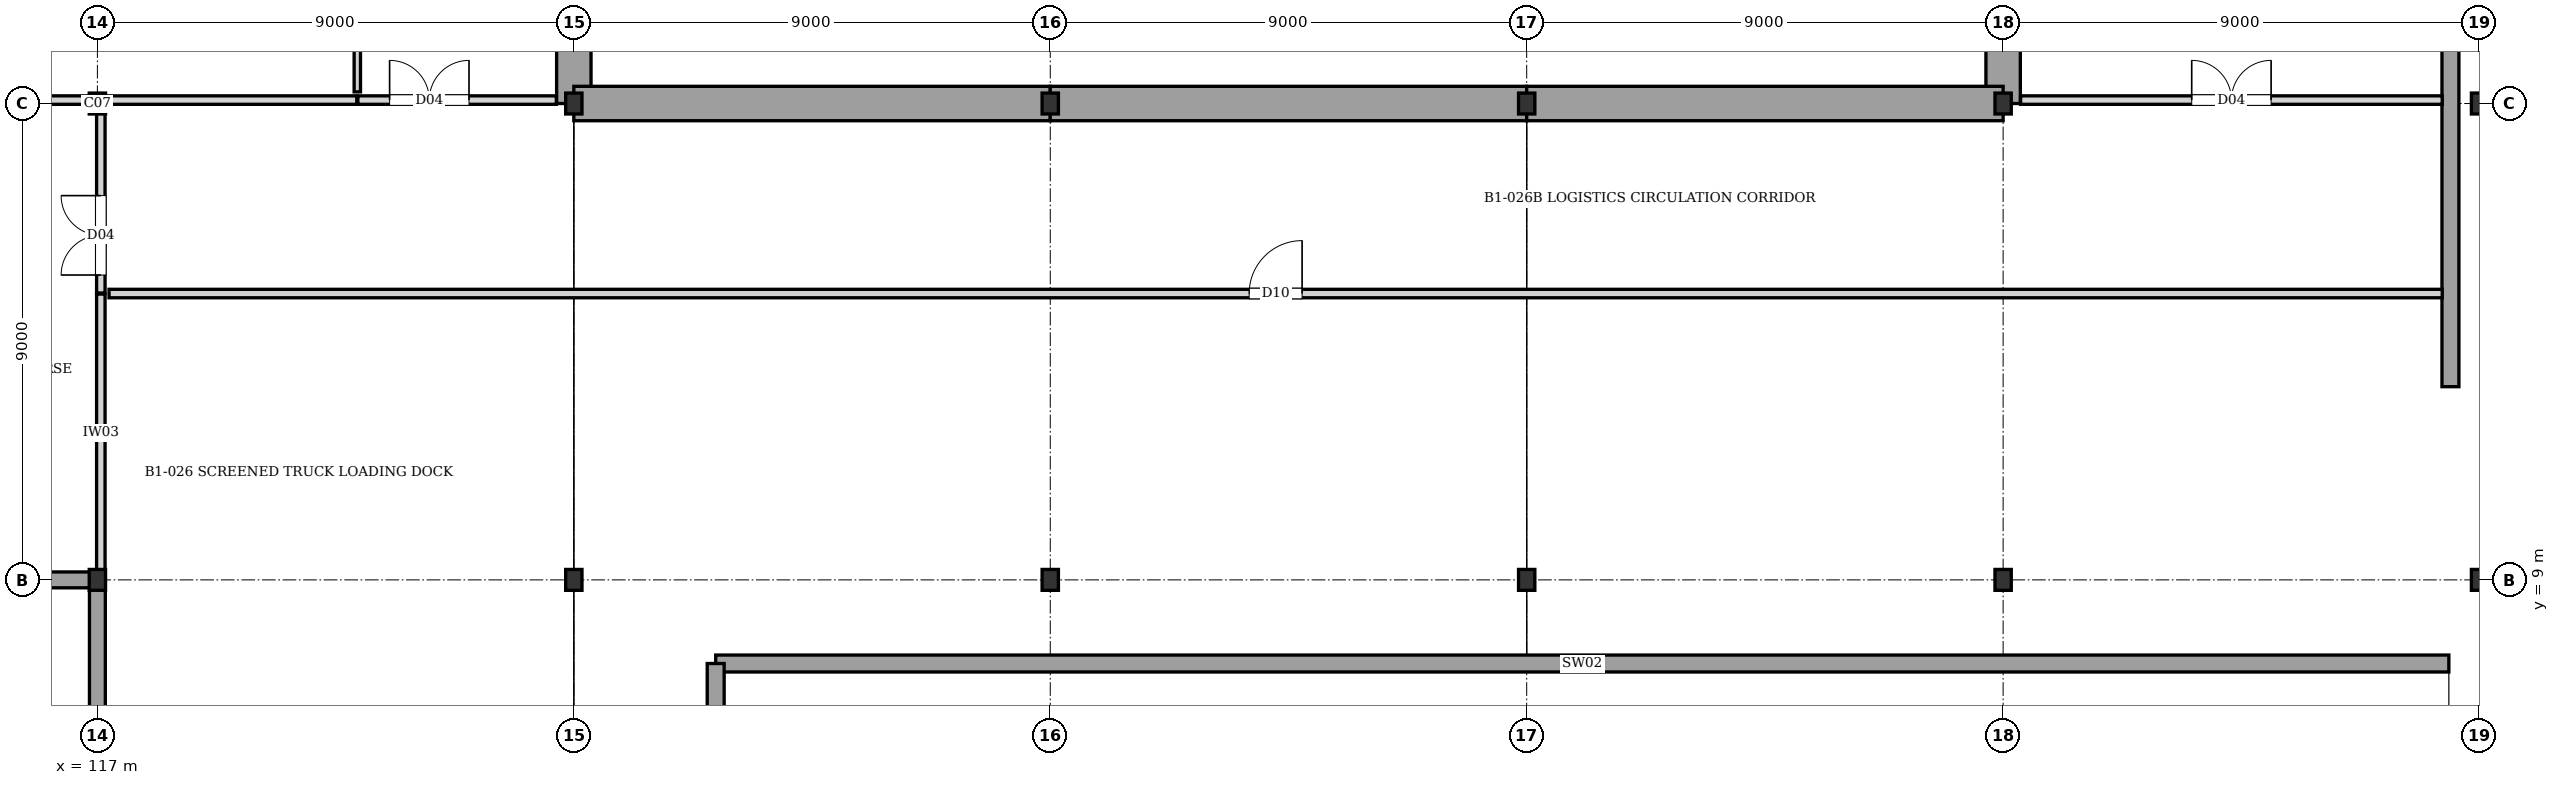
"""IFC4 building model, lengths in metres.
Left out: names, types, materials, properties, quantities, classifications, styles, units other than length and angle.
Written with IfcOpenShell. Run it as: python <this file> out.ifc"""

import sys

from ifc_helpers import new_model, si_unit, direction, frame, frame_2d, origin, origin_2d, place, context, subcontext, project, spatial, rectangle, i_section, extrude, element, fill, save


model = new_model("IFC4")
c1 = context("Model", 3, precision=1e-05, world=origin(), true_north=direction((0.0, 1.0)))
c2 = subcontext(c1, "Body", "Model", "MODEL_VIEW")
j1 = project(units=[si_unit("LENGTHUNIT", "METRE"), si_unit("PLANEANGLEUNIT", "RADIAN")], contexts=[c1])
p1 = place(None, origin())
s1 = spatial("IfcSite", under=j1, at=p1, CompositionType="ELEMENT")
p2 = place(p1, origin())
s2 = spatial("IfcBuilding", under=s1, at=p2, CompositionType="ELEMENT")
p3 = place(p2, frame((0.0, 0.0, -4.48)))
s3 = spatial("IfcBuildingStorey", under=s2, at=p3, CompositionType="ELEMENT", Elevation=-4.48)
for number, where, z_axis, x_axis in (
    (1, (117.0, 9.0, 0.0), (0.0, 0.0, 1.0), (1.0, 0.0, 0.0)),
    (2, (117.0, 18.0, 0.0), (0.0, 0.0, 1.0), (1.0, 0.0, 0.0)),
    (3, (126.0, 9.0, 0.0), (0.0, 0.0, 1.0), (1.0, 0.0, 0.0)),
    (4, (126.0, 18.0, 0.0), (0.0, 0.0, 1.0), (1.0, 0.0, 0.0)),
    (5, (135.0, 9.0, 0.0), (0.0, 0.0, 1.0), (1.0, 0.0, 0.0)),
    (6, (135.0, 18.0, 0.0), (0.0, 0.0, 1.0), (1.0, 0.0, 0.0)),
    (7, (144.0, 9.0, 0.0), (0.0, 0.0, 1.0), (1.0, 0.0, 0.0)),
    (8, (144.0, 18.0, 0.0), (0.0, 0.0, 1.0), (1.0, 0.0, 0.0)),
    (9, (153.0, 9.0, 0.0), (0.0, 0.0, 1.0), (1.0, 0.0, 0.0)),
    (10, (153.0, 18.0, 0.0), (0.0, 0.0, 1.0), (1.0, 0.0, 0.0)),
    (11, (162.0, 9.0, 0.0), (0.0, 0.0, 1.0), (1.0, 0.0, 0.0)),
    (12, (162.0, 18.0, 0.0), (0.0, 0.0, 1.0), (1.0, 0.0, 0.0)),
):
    element("IfcColumn", number, at=place(p3, frame(where, z_axis=z_axis, x_axis=x_axis)), inside=s3, PredefinedType="COLUMN", context=c2, shape_type="SweptSolid", body=[
        extrude(i_section(OverallWidth=0.308, OverallDepth=0.395, WebThickness=0.021, FlangeThickness=0.04, at=origin_2d()), origin(), (0.0, 0.0, 1.0), 4.48),
    ])
for number, where, z_axis, x_axis in (
    (13, (153.0, 18.0, 0.0), (0.0, 0.0, 1.0), (0.0, 1.0, 0.0)),
    (14, (126.0, 27.0, 0.0), (0.0, 0.0, 1.0), (0.0, -1.0, 0.0)),
    (15, (126.0, 18.0, 0.0), (0.0, 0.0, 1.0), (1.0, 0.0, 0.0)),
    (16, (135.0, 18.0, 0.0), (0.0, 0.0, 1.0), (1.0, 0.0, 0.0)),
    (17, (144.0, 18.0, 0.0), (0.0, 0.0, 1.0), (1.0, 0.0, 0.0)),
):
    element("IfcWall", number, at=place(p3, frame(where, z_axis=z_axis, x_axis=x_axis)), inside=s3, PredefinedType="USERDEFINED", context=c2, shape_type="SweptSolid", body=[
        extrude(rectangle(XDim=9.0, YDim=0.65, at=frame_2d((4.5, 0.0))), origin(), (0.0, 0.0, 1.0), 4.22),
    ])
p4 = place(p3, frame((117.0, 0.0, 0.0), z_axis=(0.0, 0.0, 1.0), x_axis=(0.0, 1.0, 0.0)))
e18 = element("IfcWall", 18, at=p4, inside=s3, PredefinedType="SHEAR", context=c2, shape_type="SweptSolid", body=[
    extrude(rectangle(XDim=9.0, YDim=0.3, at=frame_2d((4.5, 0.0))), origin(), (0.0, 0.0, 1.0), 4.22),
])
p5 = place(p3, frame((108.0, 9.0, 0.0), z_axis=(0.0, 0.0, 1.0), x_axis=(1.0, 0.0, 0.0)))
e19 = element("IfcWall", 19, at=p5, inside=s3, PredefinedType="SHEAR", context=c2, shape_type="SweptSolid", body=[
    extrude(rectangle(XDim=9.0, YDim=0.3, at=frame_2d((4.5, 0.0))), origin(), (0.0, 0.0, 1.0), 4.22),
])
p6 = place(p5, frame((6.05, 0.0, 0.0)))
e20 = element("IfcOpeningElement", 20, at=p6, cuts=e19, PredefinedType="OPENING", context=c2, shape_type="SweptSolid", body=[
    extrude(rectangle(XDim=1.4, YDim=2.02, at=frame_2d((0.7, 1.01))), frame((0.0, 0.16, 0.0), z_axis=(0.0, -1.0, 0.0), x_axis=(1.0, 0.0, 0.0)), (0.0, 0.0, 1.0), 0.32),
])
p7 = place(p3, frame((161.45, 12.65, 0.0), z_axis=(0.0, 0.0, 1.0), x_axis=(0.0, 1.0, 0.0)))
e21 = element("IfcWall", 21, at=p7, inside=s3, PredefinedType="SHEAR", context=c2, shape_type="SweptSolid", body=[
    extrude(rectangle(XDim=32.35, YDim=0.32, at=frame_2d((16.175, 0.0))), origin(), (0.0, 0.0, 1.0), 4.22),
])
p8 = place(p3, frame((128.68, 7.42, 0.0), z_axis=(0.0, 0.0, 1.0), x_axis=(1.0, 0.0, 0.0)))
e22 = element("IfcWall", 22, at=p8, inside=s3, PredefinedType="SHEAR", context=c2, shape_type="SweptSolid", body=[
    extrude(rectangle(XDim=32.74, YDim=0.32, at=frame_2d((16.37, 0.0))), origin(), (0.0, 0.0, 1.0), 4.22),
])
p9 = place(p3, frame((128.68, 1.58, 0.0), z_axis=(0.0, 0.0, 1.0), x_axis=(0.0, 1.0, 0.0)))
e23 = element("IfcWall", 23, at=p9, inside=s3, PredefinedType="SHEAR", context=c2, shape_type="SweptSolid", body=[
    extrude(rectangle(XDim=5.84, YDim=0.32, at=frame_2d((2.92, 0.0))), origin(), (0.0, 0.0, 1.0), 4.22),
])
p10 = place(p3, frame((117.065, 9.155, 0.0), z_axis=(0.0, 0.0, 1.0), x_axis=(0.0, 1.0, 0.0)))
e24 = element("IfcWall", 24, at=p10, inside=s3, PredefinedType="PARTITIONING", context=c2, shape_type="SweptSolid", body=[
    extrude(rectangle(XDim=5.245, YDim=0.16, at=frame_2d((2.623, 0.0))), origin(), (0.0, 0.0, 1.0), 3.32),
])
p11 = place(p3, frame((108.33, 18.065, 0.0), z_axis=(0.0, 0.0, 1.0), x_axis=(1.0, 0.0, 0.0)))
e25 = element("IfcWall", 25, at=p11, inside=s3, PredefinedType="PARTITIONING", context=c2, shape_type="SweptSolid", body=[
    extrude(rectangle(XDim=8.73, YDim=0.16, at=frame_2d((4.365, 0.0))), origin(), (0.0, 0.0, 1.0), 3.32),
])
p12 = place(p3, frame((117.07, 18.065, 0.0), z_axis=(0.0, 0.0, 1.0), x_axis=(1.0, 0.0, 0.0)))
e26 = element("IfcWall", 26, at=p12, inside=s3, PredefinedType="PARTITIONING", context=c2, shape_type="SweptSolid", body=[
    extrude(rectangle(XDim=4.83, YDim=0.16, at=frame_2d((2.415, 0.0))), origin(), (0.0, 0.0, 1.0), 3.32),
])
p13 = place(p3, frame((117.065, 14.42, 0.0), z_axis=(0.0, 0.0, 1.0), x_axis=(0.0, 1.0, 0.0)))
e27 = element("IfcWall", 27, at=p13, inside=s3, PredefinedType="PARTITIONING", context=c2, shape_type="SweptSolid", body=[
    extrude(rectangle(XDim=3.49, YDim=0.16, at=frame_2d((1.745, 0.0))), origin(), (0.0, 0.0, 1.0), 3.32),
])
p14 = place(p13, frame((0.34, 0.0, 0.0)))
e28 = element("IfcOpeningElement", 28, at=p14, cuts=e27, PredefinedType="OPENING", context=c2, shape_type="SweptSolid", body=[
    extrude(rectangle(XDim=1.5, YDim=2.1, at=frame_2d((0.75, 1.05))), frame((0.0, 0.09, 0.0), z_axis=(0.0, -1.0, 0.0), x_axis=(1.0, 0.0, 0.0)), (0.0, 0.0, 1.0), 0.18),
])
p15 = place(p3, frame((117.22, 14.41, 0.0), z_axis=(0.0, 0.0, 1.0), x_axis=(1.0, 0.0, 0.0)))
e29 = element("IfcWall", 29, at=p15, inside=s3, PredefinedType="PARTITIONING", context=c2, shape_type="SweptSolid", body=[
    extrude(rectangle(XDim=44.075, YDim=0.16, at=frame_2d((22.038, 0.0))), origin(), (0.0, 0.0, 1.0), 4.22),
])
p16 = place(p15, frame((21.538, 0.0, 0.0)))
e30 = element("IfcOpeningElement", 30, at=p16, cuts=e29, PredefinedType="OPENING", context=c2, shape_type="SweptSolid", body=[
    extrude(rectangle(XDim=1.0, YDim=2.1, at=frame_2d((0.5, 1.05))), frame((0.0, 0.09, 0.0), z_axis=(0.0, -1.0, 0.0), x_axis=(1.0, 0.0, 0.0)), (0.0, 0.0, 1.0), 0.18),
])
p17 = place(p3, frame((121.92, 18.065, 0.0), z_axis=(0.0, 0.0, 1.0), x_axis=(1.0, 0.0, 0.0)))
e31 = element("IfcWall", 31, at=p17, inside=s3, PredefinedType="PARTITIONING", context=c2, shape_type="SweptSolid", body=[
    extrude(rectangle(XDim=3.75, YDim=0.16, at=frame_2d((1.875, 0.0))), origin(), (0.0, 0.0, 1.0), 3.32),
])
p18 = place(p17, frame((0.6, 0.0, 0.0)))
e32 = element("IfcOpeningElement", 32, at=p18, cuts=e31, PredefinedType="OPENING", context=c2, shape_type="SweptSolid", body=[
    extrude(rectangle(XDim=1.5, YDim=2.1, at=frame_2d((0.75, 1.05))), frame((0.0, 0.09, 0.0), z_axis=(0.0, -1.0, 0.0), x_axis=(1.0, 0.0, 0.0)), (0.0, 0.0, 1.0), 0.18),
])
p19 = place(p3, frame((153.33, 18.065, 0.0), z_axis=(0.0, 0.0, 1.0), x_axis=(1.0, 0.0, 0.0)))
e33 = element("IfcWall", 33, at=p19, inside=s3, PredefinedType="PARTITIONING", context=c2, shape_type="SweptSolid", body=[
    extrude(rectangle(XDim=7.965, YDim=0.16, at=frame_2d((3.982, 0.0))), origin(), (0.0, 0.0, 1.0), 4.22),
])
p20 = place(p19, frame((3.232, 0.0, 0.0)))
e34 = element("IfcOpeningElement", 34, at=p20, cuts=e33, PredefinedType="OPENING", context=c2, shape_type="SweptSolid", body=[
    extrude(rectangle(XDim=1.5, YDim=2.1, at=frame_2d((0.75, 1.05))), frame((0.0, 0.09, 0.0), z_axis=(0.0, -1.0, 0.0), x_axis=(1.0, 0.0, 0.0)), (0.0, 0.0, 1.0), 0.18),
])
p21 = place(p3, frame((121.91, 18.22, 0.0), z_axis=(0.0, 0.0, 1.0), x_axis=(0.0, 1.0, 0.0)))
e35 = element("IfcWall", 35, at=p21, inside=s3, PredefinedType="PARTITIONING", context=c2, shape_type="SweptSolid", body=[
    extrude(rectangle(XDim=26.51, YDim=0.12, at=frame_2d((13.255, 0.0))), origin(), (0.0, 0.0, 1.0), 4.22),
])
p22 = place(p21, frame((12.755, 0.0, 0.0)))
e36 = element("IfcOpeningElement", 36, at=p22, cuts=e35, PredefinedType="OPENING", context=c2, shape_type="SweptSolid", body=[
    extrude(rectangle(XDim=1.0, YDim=2.1, at=frame_2d((0.5, 1.05))), frame((0.0, 0.07, 0.0), z_axis=(0.0, -1.0, 0.0), x_axis=(1.0, 0.0, 0.0)), (0.0, 0.0, 1.0), 0.14),
])
p23 = place(p14, origin())
e37 = element("IfcDoor", 37, at=p23, inside=s3, OperationType="DOUBLE_DOOR_SINGLE_SWING", PredefinedType="DOOR", context=c2, shape_type="SweptSolid", body=[
    extrude(rectangle(XDim=1.5, YDim=2.1, at=frame_2d((0.75, 1.05))), frame((0.0, 0.025, 0.0), z_axis=(0.0, -1.0, 0.0), x_axis=(1.0, 0.0, 0.0)), (0.0, 0.0, 1.0), 0.05),
])
fill(e28, e37)
p24 = place(p16, origin())
e38 = element("IfcDoor", 38, at=p24, inside=s3, OperationType="SINGLE_SWING_RIGHT", PredefinedType="DOOR", context=c2, shape_type="SweptSolid", body=[
    extrude(rectangle(XDim=1.0, YDim=2.1, at=frame_2d((0.5, 1.05))), frame((0.0, 0.025, 0.0), z_axis=(0.0, -1.0, 0.0), x_axis=(1.0, 0.0, 0.0)), (0.0, 0.0, 1.0), 0.05),
])
fill(e30, e38)
p25 = place(p18, origin())
e39 = element("IfcDoor", 39, at=p25, inside=s3, OperationType="DOUBLE_DOOR_SINGLE_SWING", PredefinedType="DOOR", context=c2, shape_type="SweptSolid", body=[
    extrude(rectangle(XDim=1.5, YDim=2.1, at=frame_2d((0.75, 1.05))), frame((0.0, 0.025, 0.0), z_axis=(0.0, -1.0, 0.0), x_axis=(1.0, 0.0, 0.0)), (0.0, 0.0, 1.0), 0.05),
])
fill(e32, e39)
p26 = place(p20, origin())
e40 = element("IfcDoor", 40, at=p26, inside=s3, OperationType="DOUBLE_DOOR_SINGLE_SWING", PredefinedType="DOOR", context=c2, shape_type="SweptSolid", body=[
    extrude(rectangle(XDim=1.5, YDim=2.1, at=frame_2d((0.75, 1.05))), frame((0.0, 0.025, 0.0), z_axis=(0.0, -1.0, 0.0), x_axis=(1.0, 0.0, 0.0)), (0.0, 0.0, 1.0), 0.05),
])
fill(e34, e40)
save(model, sys.argv[1])
